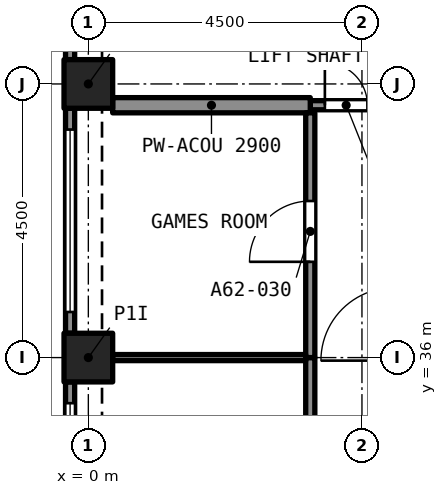
"""IFC4 building model, lengths in metres.
Left out: names, types, materials, properties, quantities, classifications, styles, units other than length and angle.
Written with IfcOpenShell. Run it as: python <this file> out.ifc"""

import sys

from ifc_helpers import new_model, si_unit, direction, frame, frame_2d, origin, origin_2d, place, context, subcontext, project, spatial, rectangle, extrude, element, fill, save


model = new_model("IFC4")
c1 = context("Model", 3, precision=1e-05, world=origin(), true_north=direction((0.0, 1.0)))
c2 = subcontext(c1, "Body", "Model", "MODEL_VIEW")
j1 = project(units=[si_unit("LENGTHUNIT", "METRE"), si_unit("PLANEANGLEUNIT", "RADIAN")], contexts=[c1])
p1 = place(None, origin())
s1 = spatial("IfcSite", under=j1, at=p1, CompositionType="ELEMENT")
p2 = place(p1, origin())
s2 = spatial("IfcBuilding", under=s1, at=p2, CompositionType="ELEMENT")
p3 = place(p2, frame((0.0, 0.0, 222.895)))
s3 = spatial("IfcBuildingStorey", under=s2, at=p3, CompositionType="ELEMENT", Elevation=222.895)
for number, where, z_axis, x_axis in (
    (1, (0.0, 36.0, 0.0), (0.0, 0.0, 1.0), (1.0, 0.0, 0.0)),
    (2, (0.0, 40.5, 0.0), (0.0, 0.0, 1.0), (1.0, 0.0, 0.0)),
):
    element("IfcColumn", number, at=place(p3, frame(where, z_axis=z_axis, x_axis=x_axis)), inside=s3, PredefinedType="COLUMN", context=c2, shape_type="SweptSolid", body=[
        extrude(rectangle(XDim=0.8, YDim=0.8, at=origin_2d()), origin(), (0.0, 0.0, 1.0), 3.2),
    ])
p4 = place(p3, frame((-0.3, 40.9, 0.0), z_axis=(0.0, 0.0, 1.0), x_axis=(0.0, 1.0, 0.0)))
e3 = element("IfcWall", 3, at=p4, inside=s3, PredefinedType="SOLIDWALL", context=c2, shape_type="SweptSolid", body=[
    extrude(rectangle(XDim=3.7, YDim=0.15, at=frame_2d((1.85, 0.0))), origin(), (0.0, 0.0, 1.0), 3.2),
])
p5 = place(p4, frame((0.35, 0.0, 0.45)))
e4 = element("IfcOpeningElement", 4, at=p5, cuts=e3, PredefinedType="OPENING", context=c2, shape_type="SweptSolid", body=[
    extrude(rectangle(XDim=3.0, YDim=1.95, at=frame_2d((1.5, 0.975))), frame((0.0, 0.085, 0.0), z_axis=(0.0, -1.0, 0.0), x_axis=(1.0, 0.0, 0.0)), (0.0, 0.0, 1.0), 0.17),
])
p6 = place(p3, frame((-0.3, 36.4, 0.0), z_axis=(0.0, 0.0, 1.0), x_axis=(0.0, 1.0, 0.0)))
e5 = element("IfcWall", 5, at=p6, inside=s3, PredefinedType="SOLIDWALL", context=c2, shape_type="SweptSolid", body=[
    extrude(rectangle(XDim=3.7, YDim=0.15, at=frame_2d((1.85, 0.0))), origin(), (0.0, 0.0, 1.0), 3.2),
])
p7 = place(p6, frame((0.35, 0.0, 0.45)))
e6 = element("IfcOpeningElement", 6, at=p7, cuts=e5, PredefinedType="OPENING", context=c2, shape_type="SweptSolid", body=[
    extrude(rectangle(XDim=3.0, YDim=1.95, at=frame_2d((1.5, 0.975))), frame((0.0, 0.085, 0.0), z_axis=(0.0, -1.0, 0.0), x_axis=(1.0, 0.0, 0.0)), (0.0, 0.0, 1.0), 0.17),
])
p8 = place(p3, frame((-0.3, 31.9, 0.0), z_axis=(0.0, 0.0, 1.0), x_axis=(0.0, 1.0, 0.0)))
e7 = element("IfcWall", 7, at=p8, inside=s3, PredefinedType="SOLIDWALL", context=c2, shape_type="SweptSolid", body=[
    extrude(rectangle(XDim=3.7, YDim=0.15, at=frame_2d((1.85, 0.0))), origin(), (0.0, 0.0, 1.0), 3.2),
])
p9 = place(p8, frame((0.35, 0.0, 0.45)))
e8 = element("IfcOpeningElement", 8, at=p9, cuts=e7, PredefinedType="OPENING", context=c2, shape_type="SweptSolid", body=[
    extrude(rectangle(XDim=3.0, YDim=1.95, at=frame_2d((1.5, 0.975))), frame((0.0, 0.085, 0.0), z_axis=(0.0, -1.0, 0.0), x_axis=(1.0, 0.0, 0.0)), (0.0, 0.0, 1.0), 0.17),
])
p10 = place(p3, frame((3.65, 40.15, 0.0), z_axis=(0.0, 0.0, 1.0), x_axis=(1.0, 0.0, 0.0)))
e9 = element("IfcWall", 9, at=p10, inside=s3, PredefinedType="PARTITIONING", context=c2, shape_type="SweptSolid", body=[
    extrude(rectangle(XDim=1.2, YDim=0.15, at=frame_2d((0.6, 0.0))), origin(), (0.0, 0.0, 1.0), 2.9),
])
p11 = place(p10, frame((0.24, 0.0, 0.0)))
e10 = element("IfcOpeningElement", 10, at=p11, cuts=e9, PredefinedType="OPENING", context=c2, shape_type="SweptSolid", body=[
    extrude(rectangle(XDim=0.7, YDim=2.1, at=frame_2d((0.35, 1.05))), frame((0.0, 0.085, 0.0), z_axis=(0.0, -1.0, 0.0), x_axis=(1.0, 0.0, 0.0)), (0.0, 0.0, 1.0), 0.17),
])
p12 = place(p3, frame((0.4, 40.15, 0.0), z_axis=(0.0, 0.0, 1.0), x_axis=(1.0, 0.0, 0.0)))
e11 = element("IfcWall", 11, at=p12, inside=s3, PredefinedType="PARTITIONING", context=c2, shape_type="SweptSolid", body=[
    extrude(rectangle(XDim=3.25, YDim=0.25, at=frame_2d((1.625, 0.0))), origin(), (0.0, 0.0, 1.0), 2.9),
])
p13 = place(p3, frame((3.65, 31.5, 0.0), z_axis=(0.0, 0.0, 1.0), x_axis=(0.0, 1.0, 0.0)))
e12 = element("IfcWall", 12, at=p13, inside=s3, PredefinedType="PARTITIONING", context=c2, shape_type="SweptSolid", body=[
    extrude(rectangle(XDim=4.5, YDim=0.15, at=frame_2d((2.25, 0.0))), origin(), (0.0, 0.0, 1.0), 2.9),
])
p14 = place(p13, frame((1.75, 0.0, 0.0)))
e13 = element("IfcOpeningElement", 13, at=p14, cuts=e12, PredefinedType="OPENING", context=c2, shape_type="SweptSolid", body=[
    extrude(rectangle(XDim=1.0, YDim=2.1, at=frame_2d((0.5, 1.05))), frame((0.0, 0.085, 0.0), z_axis=(0.0, -1.0, 0.0), x_axis=(1.0, 0.0, 0.0)), (0.0, 0.0, 1.0), 0.17),
])
p15 = place(p3, frame((3.65, 36.0, 0.0), z_axis=(0.0, 0.0, 1.0), x_axis=(0.0, 1.0, 0.0)))
e14 = element("IfcWall", 14, at=p15, inside=s3, PredefinedType="PARTITIONING", context=c2, shape_type="SweptSolid", body=[
    extrude(rectangle(XDim=4.025, YDim=0.15, at=frame_2d((2.012, 0.0))), origin(), (0.0, 0.0, 1.0), 2.9),
])
p16 = place(p15, frame((1.575, 0.0, 0.0)))
e15 = element("IfcOpeningElement", 15, at=p16, cuts=e14, PredefinedType="OPENING", context=c2, shape_type="SweptSolid", body=[
    extrude(rectangle(XDim=1.0, YDim=2.1, at=frame_2d((0.5, 1.05))), frame((0.0, 0.085, 0.0), z_axis=(0.0, -1.0, 0.0), x_axis=(1.0, 0.0, 0.0)), (0.0, 0.0, 1.0), 0.17),
])
p17 = place(p3, frame((0.4, 36.0, 0.0), z_axis=(0.0, 0.0, 1.0), x_axis=(1.0, 0.0, 0.0)))
e16 = element("IfcWall", 16, at=p17, inside=s3, PredefinedType="PARTITIONING", context=c2, shape_type="SweptSolid", body=[
    extrude(rectangle(XDim=3.175, YDim=0.1, at=frame_2d((1.587, 0.0))), origin(), (0.0, 0.0, 1.0), 2.9),
])
p18 = place(p7, origin())
e17 = element("IfcWindow", 17, at=p18, inside=s3, PartitioningType="SINGLE_PANEL", PredefinedType="WINDOW", context=c2, shape_type="SweptSolid", body=[
    extrude(rectangle(XDim=3.0, YDim=1.95, at=frame_2d((1.5, 0.975))), frame((0.0, 0.03, 0.0), z_axis=(0.0, -1.0, 0.0), x_axis=(1.0, 0.0, 0.0)), (0.0, 0.0, 1.0), 0.06),
])
fill(e6, e17)
p19 = place(p9, origin())
e18 = element("IfcWindow", 18, at=p19, inside=s3, PartitioningType="SINGLE_PANEL", PredefinedType="WINDOW", context=c2, shape_type="SweptSolid", body=[
    extrude(rectangle(XDim=3.0, YDim=1.95, at=frame_2d((1.5, 0.975))), frame((0.0, 0.03, 0.0), z_axis=(0.0, -1.0, 0.0), x_axis=(1.0, 0.0, 0.0)), (0.0, 0.0, 1.0), 0.06),
])
fill(e8, e18)
p20 = place(p11, origin())
e19 = element("IfcDoor", 19, at=p20, inside=s3, OperationType="SINGLE_SWING_LEFT", PredefinedType="DOOR", context=c2, shape_type="SweptSolid", body=[
    extrude(rectangle(XDim=0.7, YDim=2.1, at=frame_2d((0.35, 1.05))), frame((0.0, 0.025, 0.0), z_axis=(0.0, -1.0, 0.0), x_axis=(1.0, 0.0, 0.0)), (0.0, 0.0, 1.0), 0.05),
])
fill(e10, e19)
p21 = place(p16, origin())
e20 = element("IfcDoor", 20, at=p21, inside=s3, OperationType="SINGLE_SWING_RIGHT", PredefinedType="DOOR", context=c2, shape_type="SweptSolid", body=[
    extrude(rectangle(XDim=1.0, YDim=2.1, at=frame_2d((0.5, 1.05))), frame((0.0, 0.025, 0.0), z_axis=(0.0, -1.0, 0.0), x_axis=(1.0, 0.0, 0.0)), (0.0, 0.0, 1.0), 0.05),
])
fill(e15, e20)
save(model, sys.argv[1])
